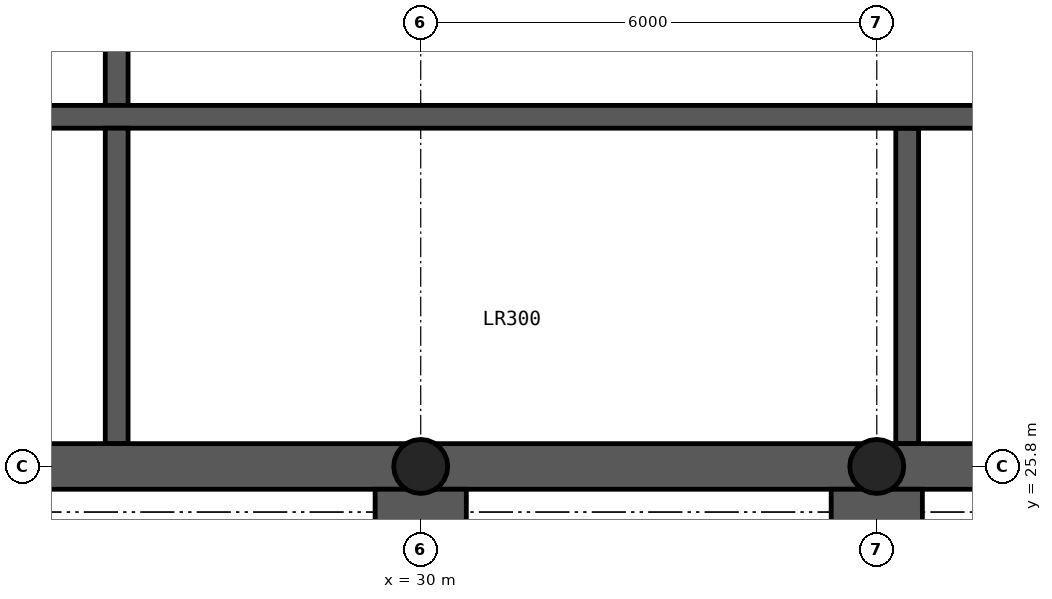
"""IFC4 building model, lengths in metres.
Left out: names, types, materials, properties, quantities, classifications, styles, units other than length and angle.
Written with IfcOpenShell. Run it as: python <this file> out.ifc"""

import sys

from ifc_helpers import new_model, si_unit, direction, frame, frame_2d, origin, origin_2d, place, context, subcontext, project, spatial, rectangle, hollow_circle, extrude, element, save


model = new_model("IFC4")
c1 = context("Model", 3, precision=1e-05, world=origin(), true_north=direction((0.0, 1.0)))
c2 = subcontext(c1, "Body", "Model", "MODEL_VIEW")
j1 = project(units=[si_unit("LENGTHUNIT", "METRE"), si_unit("PLANEANGLEUNIT", "RADIAN")], contexts=[c1])
p1 = place(None, origin())
s1 = spatial("IfcSite", under=j1, at=p1, CompositionType="ELEMENT")
p2 = place(p1, origin())
s2 = spatial("IfcBuilding", under=s1, at=p2, CompositionType="ELEMENT")
p3 = place(p2, frame((0.0, 0.0, 262.3)))
s3 = spatial("IfcBuildingStorey", under=s2, at=p3, CompositionType="ELEMENT", Elevation=262.3)
p4 = place(p3, frame((18.0, 25.8, 0.0), z_axis=(0.0, 0.0, 1.0), x_axis=(1.0, 0.0, 0.0)))
e1 = element("IfcWall", 1, at=p4, inside=s3, PredefinedType="SHEAR", context=c2, shape_type="SweptSolid", body=[
    extrude(rectangle(XDim=48.0, YDim=0.6, at=frame_2d((24.0, 0.0))), origin(), (0.0, 0.0, 1.0), 6.0),
])
p5 = place(p3, frame((18.3, 30.4, 0.0), z_axis=(0.0, 0.0, 1.0), x_axis=(1.0, 0.0, 0.0)))
e2 = element("IfcWall", 2, at=p5, inside=s3, PredefinedType="SHEAR", context=c2, shape_type="SweptSolid", body=[
    extrude(rectangle(XDim=47.4, YDim=0.3, at=frame_2d((23.7, 0.0))), origin(), (0.0, 0.0, 1.0), 6.0),
])
p6 = place(p5, frame((0.4, 0.0, 0.0)))
e3 = element("IfcOpeningElement", 3, at=p6, cuts=e2, PredefinedType="OPENING", context=c2, shape_type="SweptSolid", body=[
    extrude(rectangle(XDim=1.0, YDim=2.1, at=frame_2d((0.5, 1.05))), frame((0.0, 0.16, 0.0), z_axis=(0.0, -1.0, 0.0), x_axis=(1.0, 0.0, 0.0)), (0.0, 0.0, 1.0), 0.32),
])
p7 = place(p5, frame((46.0, 0.0, 0.0)))
e4 = element("IfcOpeningElement", 4, at=p7, cuts=e2, PredefinedType="OPENING", context=c2, shape_type="SweptSolid", body=[
    extrude(rectangle(XDim=1.0, YDim=2.1, at=frame_2d((0.5, 1.05))), frame((0.0, 0.16, 0.0), z_axis=(0.0, -1.0, 0.0), x_axis=(1.0, 0.0, 0.0)), (0.0, 0.0, 1.0), 0.32),
])
p8 = place(p5, frame((19.025, 0.0, 0.0)))
e5 = element("IfcOpeningElement", 5, at=p8, cuts=e2, PredefinedType="OPENING", context=c2, shape_type="SweptSolid", body=[
    extrude(rectangle(XDim=0.9, YDim=2.1, at=frame_2d((0.45, 1.05))), frame((0.0, 0.16, 0.0), z_axis=(0.0, -1.0, 0.0), x_axis=(1.0, 0.0, 0.0)), (0.0, 0.0, 1.0), 0.32),
])
p9 = place(p5, frame((24.525, 0.0, 0.0)))
e6 = element("IfcOpeningElement", 6, at=p9, cuts=e2, PredefinedType="OPENING", context=c2, shape_type="SweptSolid", body=[
    extrude(rectangle(XDim=0.9, YDim=2.1, at=frame_2d((0.45, 1.05))), frame((0.0, 0.16, 0.0), z_axis=(0.0, -1.0, 0.0), x_axis=(1.0, 0.0, 0.0)), (0.0, 0.0, 1.0), 0.32),
])
p10 = place(p5, frame((30.317, 0.0, 0.0)))
e7 = element("IfcOpeningElement", 7, at=p10, cuts=e2, PredefinedType="OPENING", context=c2, shape_type="SweptSolid", body=[
    extrude(rectangle(XDim=1.1, YDim=2.1, at=frame_2d((0.55, 1.05))), frame((0.0, 0.16, 0.0), z_axis=(0.0, -1.0, 0.0), x_axis=(1.0, 0.0, 0.0)), (0.0, 0.0, 1.0), 0.32),
])
p11 = place(p5, frame((33.85, 0.0, 0.0)))
e8 = element("IfcOpeningElement", 8, at=p11, cuts=e2, PredefinedType="OPENING", context=c2, shape_type="SweptSolid", body=[
    extrude(rectangle(XDim=1.1, YDim=2.1, at=frame_2d((0.55, 1.05))), frame((0.0, 0.16, 0.0), z_axis=(0.0, -1.0, 0.0), x_axis=(1.0, 0.0, 0.0)), (0.0, 0.0, 1.0), 0.32),
])
p12 = place(p5, frame((37.383, 0.0, 0.0)))
e9 = element("IfcOpeningElement", 9, at=p12, cuts=e2, PredefinedType="OPENING", context=c2, shape_type="SweptSolid", body=[
    extrude(rectangle(XDim=1.1, YDim=2.1, at=frame_2d((0.55, 1.05))), frame((0.0, 0.16, 0.0), z_axis=(0.0, -1.0, 0.0), x_axis=(1.0, 0.0, 0.0)), (0.0, 0.0, 1.0), 0.32),
])
p13 = place(p3, frame((26.0, 26.1, 0.0), z_axis=(0.0, 0.0, 1.0), x_axis=(0.0, 1.0, 0.0)))
e10 = element("IfcWall", 10, at=p13, inside=s3, PredefinedType="SHEAR", context=c2, shape_type="SweptSolid", body=[
    extrude(rectangle(XDim=4.15, YDim=0.3, at=frame_2d((2.075, 0.0))), origin(), (0.0, 0.0, 1.0), 6.0),
])
p14 = place(p3, frame((26.0, 30.55, 0.0), z_axis=(0.0, 0.0, 1.0), x_axis=(0.0, 1.0, 0.0)))
e11 = element("IfcWall", 11, at=p14, inside=s3, PredefinedType="SHEAR", context=c2, shape_type="SweptSolid", body=[
    extrude(rectangle(XDim=3.9, YDim=0.3, at=frame_2d((1.95, 0.0))), origin(), (0.0, 0.0, 1.0), 6.0),
])
p15 = place(p14, frame((1.4, 0.0, 0.0)))
e12 = element("IfcOpeningElement", 12, at=p15, cuts=e11, PredefinedType="OPENING", context=c2, shape_type="SweptSolid", body=[
    extrude(rectangle(XDim=1.2, YDim=2.1, at=frame_2d((0.6, 1.05))), frame((0.0, 0.16, 0.0), z_axis=(0.0, -1.0, 0.0), x_axis=(1.0, 0.0, 0.0)), (0.0, 0.0, 1.0), 0.32),
])
p16 = place(p3, frame((36.4, 26.1, 0.0), z_axis=(0.0, 0.0, 1.0), x_axis=(0.0, 1.0, 0.0)))
e13 = element("IfcWall", 13, at=p16, inside=s3, PredefinedType="SHEAR", context=c2, shape_type="SweptSolid", body=[
    extrude(rectangle(XDim=4.15, YDim=0.3, at=frame_2d((2.075, 0.0))), origin(), (0.0, 0.0, 1.0), 6.0),
])
p17 = place(p3, frame((30.0, 12.05, 0.0), z_axis=(0.0, 0.0, 1.0), x_axis=(0.0, 1.0, 0.0)))
e14 = element("IfcWall", 14, at=p17, inside=s3, PredefinedType="SHEAR", context=c2, shape_type="SweptSolid", body=[
    extrude(rectangle(XDim=13.45, YDim=1.2, at=frame_2d((6.725, 0.0))), origin(), (0.0, 0.0, 1.0), 4.4),
])
p18 = place(p17, frame((6.25, 0.0, 0.0)))
e15 = element("IfcOpeningElement", 15, at=p18, cuts=e14, PredefinedType="OPENING", context=c2, shape_type="SweptSolid", body=[
    extrude(rectangle(XDim=1.0, YDim=2.1, at=frame_2d((0.5, 1.05))), frame((0.0, 0.61, 0.0), z_axis=(0.0, -1.0, 0.0), x_axis=(1.0, 0.0, 0.0)), (0.0, 0.0, 1.0), 1.22),
])
p19 = place(p3, frame((36.0, 12.05, 0.0), z_axis=(0.0, 0.0, 1.0), x_axis=(0.0, 1.0, 0.0)))
e16 = element("IfcWall", 16, at=p19, inside=s3, PredefinedType="SHEAR", context=c2, shape_type="SweptSolid", body=[
    extrude(rectangle(XDim=13.45, YDim=1.2, at=frame_2d((6.725, 0.0))), origin(), (0.0, 0.0, 1.0), 4.4),
])
p20 = place(p19, frame((6.25, 0.0, 0.0)))
e17 = element("IfcOpeningElement", 17, at=p20, cuts=e16, PredefinedType="OPENING", context=c2, shape_type="SweptSolid", body=[
    extrude(rectangle(XDim=1.0, YDim=2.1, at=frame_2d((0.5, 1.05))), frame((0.0, 0.61, 0.0), z_axis=(0.0, -1.0, 0.0), x_axis=(1.0, 0.0, 0.0)), (0.0, 0.0, 1.0), 1.22),
])
for number, where, z_axis, x_axis in (
    (18, (30.0, 25.8, 0.0), (0.0, 0.0, 1.0), (1.0, 0.0, 0.0)),
    (19, (36.0, 25.8, 0.0), (0.0, 0.0, 1.0), (1.0, 0.0, 0.0)),
):
    element("IfcColumn", number, at=place(p3, frame(where, z_axis=z_axis, x_axis=x_axis)), inside=s3, PredefinedType="COLUMN", context=c2, shape_type="SweptSolid", body=[
        extrude(hollow_circle(Radius=0.355, WallThickness=0.025, at=origin_2d()), origin(), (0.0, 0.0, 1.0), 8.426),
    ])
save(model, sys.argv[1])
